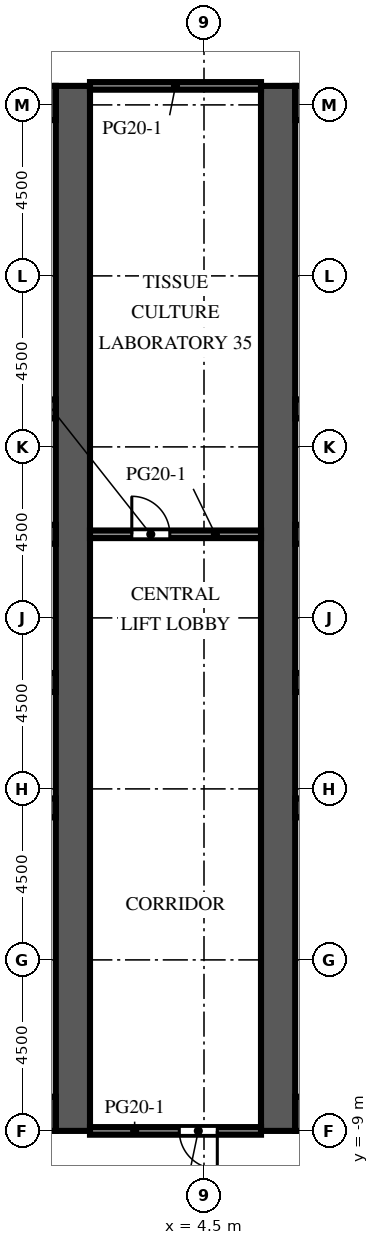
"""IFC4 building model, lengths in metres.
Left out: names, types, materials, properties, quantities, classifications, styles, units other than length and angle.
Written with IfcOpenShell. Run it as: python <this file> out.ifc"""

import sys

from ifc_helpers import new_model, si_unit, direction, frame, frame_2d, origin, place, context, subcontext, project, spatial, rectangle, extrude, element, fill, save


model = new_model("IFC4")
c1 = context("Model", 3, precision=1e-05, world=origin(), true_north=direction((0.0, 1.0)))
c2 = subcontext(c1, "Body", "Model", "MODEL_VIEW")
j1 = project(units=[si_unit("LENGTHUNIT", "METRE"), si_unit("PLANEANGLEUNIT", "RADIAN")], contexts=[c1])
p1 = place(None, origin())
s1 = spatial("IfcSite", under=j1, at=p1, CompositionType="ELEMENT")
p2 = place(p1, origin())
s2 = spatial("IfcBuilding", under=s1, at=p2, CompositionType="ELEMENT")
p3 = place(p2, frame((0.0, 0.0, 90.2)))
s3 = spatial("IfcBuildingStorey", under=s2, at=p3, CompositionType="ELEMENT", Elevation=90.2)
p4 = place(p3, frame((1.05, -9.0, 0.0), z_axis=(0.0, 0.0, 1.0), x_axis=(0.0, 1.0, 0.0)))
e1 = element("IfcWall", 1, at=p4, inside=s3, PredefinedType="SHEAR", context=c2, shape_type="SweptSolid", body=[
    extrude(rectangle(XDim=27.5, YDim=0.9, at=frame_2d((13.75, 0.0))), origin(), (0.0, 0.0, 1.0), 4.1),
])
p5 = place(p4, frame((12.55, 0.0, 0.0)))
e2 = element("IfcOpeningElement", 2, at=p5, cuts=e1, PredefinedType="OPENING", context=c2, shape_type="SweptSolid", body=[
    extrude(rectangle(XDim=2.4, YDim=2.4, at=frame_2d((1.2, 1.2))), frame((0.0, 0.46, 0.0), z_axis=(0.0, -1.0, 0.0), x_axis=(1.0, 0.0, 0.0)), (0.0, 0.0, 1.0), 0.92),
])
p6 = place(p4, frame((3.975, 0.0, 0.0)))
e3 = element("IfcOpeningElement", 3, at=p6, cuts=e1, PredefinedType="OPENING", context=c2, shape_type="SweptSolid", body=[
    extrude(rectangle(XDim=1.2, YDim=2.1, at=frame_2d((0.6, 1.05))), frame((0.0, 0.46, 0.0), z_axis=(0.0, -1.0, 0.0), x_axis=(1.0, 0.0, 0.0)), (0.0, 0.0, 1.0), 0.92),
])
p7 = place(p4, frame((22.325, 0.0, 0.0)))
e4 = element("IfcOpeningElement", 4, at=p7, cuts=e1, PredefinedType="OPENING", context=c2, shape_type="SweptSolid", body=[
    extrude(rectangle(XDim=1.2, YDim=2.1, at=frame_2d((0.6, 1.05))), frame((0.0, 0.46, 0.0), z_axis=(0.0, -1.0, 0.0), x_axis=(1.0, 0.0, 0.0)), (0.0, 0.0, 1.0), 0.92),
])
for number, where, z_axis, x_axis in (
    (5, (-9.6, -8.55, 0.0), (0.0, 0.0, 1.0), (1.0, 0.0, 0.0)),
    (6, (-9.6, 18.05, 0.0), (0.0, 0.0, 1.0), (1.0, 0.0, 0.0)),
):
    element("IfcWall", number, at=place(p3, frame(where, z_axis=z_axis, x_axis=x_axis)), inside=s3, PredefinedType="SHEAR", context=c2, shape_type="SweptSolid", body=[
        extrude(rectangle(XDim=10.2, YDim=0.9, at=frame_2d((5.1, 0.0))), origin(), (0.0, 0.0, 1.0), 4.1),
    ])
p8 = place(p3, frame((-9.6, -0.5, 0.0), z_axis=(0.0, 0.0, 1.0), x_axis=(1.0, 0.0, 0.0)))
e7 = element("IfcWall", 7, at=p8, inside=s3, PredefinedType="SHEAR", context=c2, shape_type="SweptSolid", body=[
    extrude(rectangle(XDim=10.2, YDim=0.5, at=frame_2d((5.1, 0.0))), origin(), (0.0, 0.0, 1.0), 4.1),
])
p9 = place(p3, frame((-9.6, 2.8, 0.0), z_axis=(0.0, 0.0, 1.0), x_axis=(1.0, 0.0, 0.0)))
e8 = element("IfcWall", 8, at=p9, inside=s3, PredefinedType="SHEAR", context=c2, shape_type="SweptSolid", body=[
    extrude(rectangle(XDim=10.2, YDim=0.5, at=frame_2d((5.1, 0.0))), origin(), (0.0, 0.0, 1.0), 4.1),
])
p10 = place(p9, frame((0.562, 0.0, 0.0)))
e9 = element("IfcOpeningElement", 9, at=p10, cuts=e8, PredefinedType="OPENING", context=c2, shape_type="SweptSolid", body=[
    extrude(rectangle(XDim=1.1, YDim=2.1, at=frame_2d((0.55, 1.05))), frame((0.0, 0.26, 0.0), z_axis=(0.0, -1.0, 0.0), x_axis=(1.0, 0.0, 0.0)), (0.0, 0.0, 1.0), 0.52),
])
p11 = place(p9, frame((3.238, 0.0, 0.0)))
e10 = element("IfcOpeningElement", 10, at=p11, cuts=e8, PredefinedType="OPENING", context=c2, shape_type="SweptSolid", body=[
    extrude(rectangle(XDim=1.1, YDim=2.1, at=frame_2d((0.55, 1.05))), frame((0.0, 0.26, 0.0), z_axis=(0.0, -1.0, 0.0), x_axis=(1.0, 0.0, 0.0)), (0.0, 0.0, 1.0), 0.52),
])
p12 = place(p9, frame((8.538, 0.0, 0.0)))
e11 = element("IfcOpeningElement", 11, at=p12, cuts=e8, PredefinedType="OPENING", context=c2, shape_type="SweptSolid", body=[
    extrude(rectangle(XDim=1.1, YDim=2.1, at=frame_2d((0.55, 1.05))), frame((0.0, 0.26, 0.0), z_axis=(0.0, -1.0, 0.0), x_axis=(1.0, 0.0, 0.0)), (0.0, 0.0, 1.0), 0.52),
])
p13 = place(p3, frame((-9.6, 6.7, 0.0), z_axis=(0.0, 0.0, 1.0), x_axis=(1.0, 0.0, 0.0)))
e12 = element("IfcWall", 12, at=p13, inside=s3, PredefinedType="SHEAR", context=c2, shape_type="SweptSolid", body=[
    extrude(rectangle(XDim=10.2, YDim=0.5, at=frame_2d((5.1, 0.0))), origin(), (0.0, 0.0, 1.0), 4.1),
])
p14 = place(p13, frame((0.562, 0.0, 0.0)))
e13 = element("IfcOpeningElement", 13, at=p14, cuts=e12, PredefinedType="OPENING", context=c2, shape_type="SweptSolid", body=[
    extrude(rectangle(XDim=1.1, YDim=2.1, at=frame_2d((0.55, 1.05))), frame((0.0, 0.26, 0.0), z_axis=(0.0, -1.0, 0.0), x_axis=(1.0, 0.0, 0.0)), (0.0, 0.0, 1.0), 0.52),
])
p15 = place(p13, frame((3.288, 0.0, 0.0)))
e14 = element("IfcOpeningElement", 14, at=p15, cuts=e12, PredefinedType="OPENING", context=c2, shape_type="SweptSolid", body=[
    extrude(rectangle(XDim=1.0, YDim=2.1, at=frame_2d((0.5, 1.05))), frame((0.0, 0.26, 0.0), z_axis=(0.0, -1.0, 0.0), x_axis=(1.0, 0.0, 0.0)), (0.0, 0.0, 1.0), 0.52),
])
p16 = place(p13, frame((5.913, 0.0, 0.0)))
e15 = element("IfcOpeningElement", 15, at=p16, cuts=e12, PredefinedType="OPENING", context=c2, shape_type="SweptSolid", body=[
    extrude(rectangle(XDim=1.0, YDim=2.1, at=frame_2d((0.5, 1.05))), frame((0.0, 0.26, 0.0), z_axis=(0.0, -1.0, 0.0), x_axis=(1.0, 0.0, 0.0)), (0.0, 0.0, 1.0), 0.52),
])
p17 = place(p13, frame((8.587, 0.0, 0.0)))
e16 = element("IfcOpeningElement", 16, at=p17, cuts=e12, PredefinedType="OPENING", context=c2, shape_type="SweptSolid", body=[
    extrude(rectangle(XDim=1.0, YDim=2.1, at=frame_2d((0.5, 1.05))), frame((0.0, 0.26, 0.0), z_axis=(0.0, -1.0, 0.0), x_axis=(1.0, 0.0, 0.0)), (0.0, 0.0, 1.0), 0.52),
])
p18 = place(p3, frame((-9.6, 10.0, 0.0), z_axis=(0.0, 0.0, 1.0), x_axis=(1.0, 0.0, 0.0)))
e17 = element("IfcWall", 17, at=p18, inside=s3, PredefinedType="SHEAR", context=c2, shape_type="SweptSolid", body=[
    extrude(rectangle(XDim=10.2, YDim=0.5, at=frame_2d((5.1, 0.0))), origin(), (0.0, 0.0, 1.0), 4.1),
])
p19 = place(p3, frame((6.45, -9.0, 0.0), z_axis=(0.0, 0.0, 1.0), x_axis=(0.0, 1.0, 0.0)))
e18 = element("IfcWall", 18, at=p19, inside=s3, PredefinedType="SHEAR", context=c2, shape_type="SweptSolid", body=[
    extrude(rectangle(XDim=27.5, YDim=0.9, at=frame_2d((13.75, 0.0))), origin(), (0.0, 0.0, 1.0), 4.1),
])
p20 = place(p19, frame((12.55, 0.0, 0.0)))
e19 = element("IfcOpeningElement", 19, at=p20, cuts=e18, PredefinedType="OPENING", context=c2, shape_type="SweptSolid", body=[
    extrude(rectangle(XDim=2.4, YDim=2.4, at=frame_2d((1.2, 1.2))), frame((0.0, 0.46, 0.0), z_axis=(0.0, -1.0, 0.0), x_axis=(1.0, 0.0, 0.0)), (0.0, 0.0, 1.0), 0.92),
])
p21 = place(p19, frame((3.975, 0.0, 0.0)))
e20 = element("IfcOpeningElement", 20, at=p21, cuts=e18, PredefinedType="OPENING", context=c2, shape_type="SweptSolid", body=[
    extrude(rectangle(XDim=1.2, YDim=2.1, at=frame_2d((0.6, 1.05))), frame((0.0, 0.46, 0.0), z_axis=(0.0, -1.0, 0.0), x_axis=(1.0, 0.0, 0.0)), (0.0, 0.0, 1.0), 0.92),
])
p22 = place(p19, frame((22.325, 0.0, 0.0)))
e21 = element("IfcOpeningElement", 21, at=p22, cuts=e18, PredefinedType="OPENING", context=c2, shape_type="SweptSolid", body=[
    extrude(rectangle(XDim=1.2, YDim=2.1, at=frame_2d((0.6, 1.05))), frame((0.0, 0.46, 0.0), z_axis=(0.0, -1.0, 0.0), x_axis=(1.0, 0.0, 0.0)), (0.0, 0.0, 1.0), 0.92),
])
for number, where, z_axis, x_axis in (
    (22, (6.9, -8.55, 0.0), (0.0, 0.0, 1.0), (1.0, 0.0, 0.0)),
    (23, (6.9, 18.05, 0.0), (0.0, 0.0, 1.0), (1.0, 0.0, 0.0)),
):
    element("IfcWall", number, at=place(p3, frame(where, z_axis=z_axis, x_axis=x_axis)), inside=s3, PredefinedType="SHEAR", context=c2, shape_type="SweptSolid", body=[
        extrude(rectangle(XDim=10.2, YDim=0.9, at=frame_2d((5.1, 0.0))), origin(), (0.0, 0.0, 1.0), 4.1),
    ])
p23 = place(p3, frame((6.9, -0.5, 0.0), z_axis=(0.0, 0.0, 1.0), x_axis=(1.0, 0.0, 0.0)))
e24 = element("IfcWall", 24, at=p23, inside=s3, PredefinedType="SHEAR", context=c2, shape_type="SweptSolid", body=[
    extrude(rectangle(XDim=10.2, YDim=0.5, at=frame_2d((5.1, 0.0))), origin(), (0.0, 0.0, 1.0), 4.1),
])
p24 = place(p3, frame((6.9, 2.8, 0.0), z_axis=(0.0, 0.0, 1.0), x_axis=(1.0, 0.0, 0.0)))
e25 = element("IfcWall", 25, at=p24, inside=s3, PredefinedType="SHEAR", context=c2, shape_type="SweptSolid", body=[
    extrude(rectangle(XDim=10.2, YDim=0.5, at=frame_2d((5.1, 0.0))), origin(), (0.0, 0.0, 1.0), 4.1),
])
p25 = place(p24, frame((0.562, 0.0, 0.0)))
e26 = element("IfcOpeningElement", 26, at=p25, cuts=e25, PredefinedType="OPENING", context=c2, shape_type="SweptSolid", body=[
    extrude(rectangle(XDim=1.1, YDim=2.1, at=frame_2d((0.55, 1.05))), frame((0.0, 0.26, 0.0), z_axis=(0.0, -1.0, 0.0), x_axis=(1.0, 0.0, 0.0)), (0.0, 0.0, 1.0), 0.52),
])
p26 = place(p24, frame((3.238, 0.0, 0.0)))
e27 = element("IfcOpeningElement", 27, at=p26, cuts=e25, PredefinedType="OPENING", context=c2, shape_type="SweptSolid", body=[
    extrude(rectangle(XDim=1.1, YDim=2.1, at=frame_2d((0.55, 1.05))), frame((0.0, 0.26, 0.0), z_axis=(0.0, -1.0, 0.0), x_axis=(1.0, 0.0, 0.0)), (0.0, 0.0, 1.0), 0.52),
])
p27 = place(p24, frame((8.538, 0.0, 0.0)))
e28 = element("IfcOpeningElement", 28, at=p27, cuts=e25, PredefinedType="OPENING", context=c2, shape_type="SweptSolid", body=[
    extrude(rectangle(XDim=1.1, YDim=2.1, at=frame_2d((0.55, 1.05))), frame((0.0, 0.26, 0.0), z_axis=(0.0, -1.0, 0.0), x_axis=(1.0, 0.0, 0.0)), (0.0, 0.0, 1.0), 0.52),
])
p28 = place(p3, frame((6.9, 6.7, 0.0), z_axis=(0.0, 0.0, 1.0), x_axis=(1.0, 0.0, 0.0)))
e29 = element("IfcWall", 29, at=p28, inside=s3, PredefinedType="SHEAR", context=c2, shape_type="SweptSolid", body=[
    extrude(rectangle(XDim=10.2, YDim=0.5, at=frame_2d((5.1, 0.0))), origin(), (0.0, 0.0, 1.0), 4.1),
])
p29 = place(p28, frame((0.562, 0.0, 0.0)))
e30 = element("IfcOpeningElement", 30, at=p29, cuts=e29, PredefinedType="OPENING", context=c2, shape_type="SweptSolid", body=[
    extrude(rectangle(XDim=1.1, YDim=2.1, at=frame_2d((0.55, 1.05))), frame((0.0, 0.26, 0.0), z_axis=(0.0, -1.0, 0.0), x_axis=(1.0, 0.0, 0.0)), (0.0, 0.0, 1.0), 0.52),
])
p30 = place(p28, frame((3.288, 0.0, 0.0)))
e31 = element("IfcOpeningElement", 31, at=p30, cuts=e29, PredefinedType="OPENING", context=c2, shape_type="SweptSolid", body=[
    extrude(rectangle(XDim=1.0, YDim=2.1, at=frame_2d((0.5, 1.05))), frame((0.0, 0.26, 0.0), z_axis=(0.0, -1.0, 0.0), x_axis=(1.0, 0.0, 0.0)), (0.0, 0.0, 1.0), 0.52),
])
p31 = place(p28, frame((5.913, 0.0, 0.0)))
e32 = element("IfcOpeningElement", 32, at=p31, cuts=e29, PredefinedType="OPENING", context=c2, shape_type="SweptSolid", body=[
    extrude(rectangle(XDim=1.0, YDim=2.1, at=frame_2d((0.5, 1.05))), frame((0.0, 0.26, 0.0), z_axis=(0.0, -1.0, 0.0), x_axis=(1.0, 0.0, 0.0)), (0.0, 0.0, 1.0), 0.52),
])
p32 = place(p28, frame((8.587, 0.0, 0.0)))
e33 = element("IfcOpeningElement", 33, at=p32, cuts=e29, PredefinedType="OPENING", context=c2, shape_type="SweptSolid", body=[
    extrude(rectangle(XDim=1.0, YDim=2.1, at=frame_2d((0.5, 1.05))), frame((0.0, 0.26, 0.0), z_axis=(0.0, -1.0, 0.0), x_axis=(1.0, 0.0, 0.0)), (0.0, 0.0, 1.0), 0.52),
])
p33 = place(p3, frame((6.9, 10.0, 0.0), z_axis=(0.0, 0.0, 1.0), x_axis=(1.0, 0.0, 0.0)))
e34 = element("IfcWall", 34, at=p33, inside=s3, PredefinedType="SHEAR", context=c2, shape_type="SweptSolid", body=[
    extrude(rectangle(XDim=10.2, YDim=0.5, at=frame_2d((5.1, 0.0))), origin(), (0.0, 0.0, 1.0), 4.1),
])
p34 = place(p3, frame((6.0, -9.0, 0.0), z_axis=(0.0, 0.0, 1.0), x_axis=(-1.0, 0.0, 0.0)))
e35 = element("IfcWall", 35, at=p34, inside=s3, PredefinedType="PARTITIONING", context=c2, shape_type="SweptSolid", body=[
    extrude(rectangle(XDim=4.5, YDim=0.2, at=frame_2d((2.25, 0.0))), origin(), (0.0, 0.0, 1.0), 3.65),
])
p35 = place(p34, frame((1.15, 0.0, 0.0)))
e36 = element("IfcOpeningElement", 36, at=p35, cuts=e35, PredefinedType="OPENING", context=c2, shape_type="SweptSolid", body=[
    extrude(rectangle(XDim=1.0, YDim=2.1, at=frame_2d((0.5, 1.05))), frame((0.0, 0.11, 0.0), z_axis=(0.0, -1.0, 0.0), x_axis=(1.0, 0.0, 0.0)), (0.0, 0.0, 1.0), 0.22),
])
p36 = place(p3, frame((1.5, 6.7, 0.0), z_axis=(0.0, 0.0, 1.0), x_axis=(1.0, 0.0, 0.0)))
e37 = element("IfcWall", 37, at=p36, inside=s3, PredefinedType="PARTITIONING", context=c2, shape_type="SweptSolid", body=[
    extrude(rectangle(XDim=4.5, YDim=0.2, at=frame_2d((2.25, 0.0))), origin(), (0.0, 0.0, 1.0), 3.65),
])
p37 = place(p36, frame((1.1, 0.0, 0.0)))
e38 = element("IfcOpeningElement", 38, at=p37, cuts=e37, PredefinedType="OPENING", context=c2, shape_type="SweptSolid", body=[
    extrude(rectangle(XDim=1.0, YDim=2.1, at=frame_2d((0.5, 1.05))), frame((0.0, 0.11, 0.0), z_axis=(0.0, -1.0, 0.0), x_axis=(1.0, 0.0, 0.0)), (0.0, 0.0, 1.0), 0.22),
])
p38 = place(p3, frame((1.5, 18.5, 0.0), z_axis=(0.0, 0.0, 1.0), x_axis=(1.0, 0.0, 0.0)))
e39 = element("IfcWall", 39, at=p38, inside=s3, PredefinedType="PARTITIONING", context=c2, shape_type="SweptSolid", body=[
    extrude(rectangle(XDim=4.5, YDim=0.2, at=frame_2d((2.25, 0.0))), origin(), (0.0, 0.0, 1.0), 3.65),
])
p39 = place(p5, origin())
e40 = element("IfcDoor", 40, at=p39, inside=s3, OperationType="DOUBLE_DOOR_DOUBLE_SWING", PredefinedType="DOOR", context=c2, shape_type="SweptSolid", body=[
    extrude(rectangle(XDim=2.4, YDim=2.4, at=frame_2d((1.2, 1.2))), frame((0.0, 0.025, 0.0), z_axis=(0.0, -1.0, 0.0), x_axis=(1.0, 0.0, 0.0)), (0.0, 0.0, 1.0), 0.05),
])
fill(e2, e40)
p40 = place(p20, origin())
e41 = element("IfcDoor", 41, at=p40, inside=s3, OperationType="DOUBLE_DOOR_DOUBLE_SWING", PredefinedType="DOOR", context=c2, shape_type="SweptSolid", body=[
    extrude(rectangle(XDim=2.4, YDim=2.4, at=frame_2d((1.2, 1.2))), frame((0.0, 0.025, 0.0), z_axis=(0.0, -1.0, 0.0), x_axis=(1.0, 0.0, 0.0)), (0.0, 0.0, 1.0), 0.05),
])
fill(e19, e41)
p41 = place(p6, origin())
e42 = element("IfcDoor", 42, at=p41, inside=s3, OperationType="SINGLE_SWING_LEFT", PredefinedType="DOOR", context=c2, shape_type="SweptSolid", body=[
    extrude(rectangle(XDim=1.2, YDim=2.1, at=frame_2d((0.6, 1.05))), frame((0.0, 0.425, 0.0), z_axis=(0.0, -1.0, 0.0), x_axis=(1.0, 0.0, 0.0)), (0.0, 0.0, 1.0), 0.05),
])
fill(e3, e42)
p42 = place(p7, origin())
e43 = element("IfcDoor", 43, at=p42, inside=s3, OperationType="SINGLE_SWING_LEFT", PredefinedType="DOOR", context=c2, shape_type="SweptSolid", body=[
    extrude(rectangle(XDim=1.2, YDim=2.1, at=frame_2d((0.6, 1.05))), frame((0.0, 0.425, 0.0), z_axis=(0.0, -1.0, 0.0), x_axis=(1.0, 0.0, 0.0)), (0.0, 0.0, 1.0), 0.05),
])
fill(e4, e43)
p43 = place(p21, origin())
e44 = element("IfcDoor", 44, at=p43, inside=s3, OperationType="SINGLE_SWING_RIGHT", PredefinedType="DOOR", context=c2, shape_type="SweptSolid", body=[
    extrude(rectangle(XDim=1.2, YDim=2.1, at=frame_2d((0.6, 1.05))), frame((0.0, -0.375, 0.0), z_axis=(0.0, -1.0, 0.0), x_axis=(1.0, 0.0, 0.0)), (0.0, 0.0, 1.0), 0.05),
])
fill(e20, e44)
p44 = place(p22, origin())
e45 = element("IfcDoor", 45, at=p44, inside=s3, OperationType="SINGLE_SWING_RIGHT", PredefinedType="DOOR", context=c2, shape_type="SweptSolid", body=[
    extrude(rectangle(XDim=1.2, YDim=2.1, at=frame_2d((0.6, 1.05))), frame((0.0, -0.375, 0.0), z_axis=(0.0, -1.0, 0.0), x_axis=(1.0, 0.0, 0.0)), (0.0, 0.0, 1.0), 0.05),
])
fill(e21, e45)
p45 = place(p35, origin())
e46 = element("IfcDoor", 46, at=p45, inside=s3, OperationType="SINGLE_SWING_LEFT", PredefinedType="DOOR", context=c2, shape_type="SweptSolid", body=[
    extrude(rectangle(XDim=1.0, YDim=2.1, at=frame_2d((0.5, 1.05))), frame((0.0, 0.025, 0.0), z_axis=(0.0, -1.0, 0.0), x_axis=(1.0, 0.0, 0.0)), (0.0, 0.0, 1.0), 0.05),
])
fill(e36, e46)
p46 = place(p37, origin())
e47 = element("IfcDoor", 47, at=p46, inside=s3, OperationType="SINGLE_SWING_LEFT", PredefinedType="DOOR", context=c2, shape_type="SweptSolid", body=[
    extrude(rectangle(XDim=1.0, YDim=2.1, at=frame_2d((0.5, 1.05))), frame((0.0, 0.025, 0.0), z_axis=(0.0, -1.0, 0.0), x_axis=(1.0, 0.0, 0.0)), (0.0, 0.0, 1.0), 0.05),
])
fill(e38, e47)
save(model, sys.argv[1])
